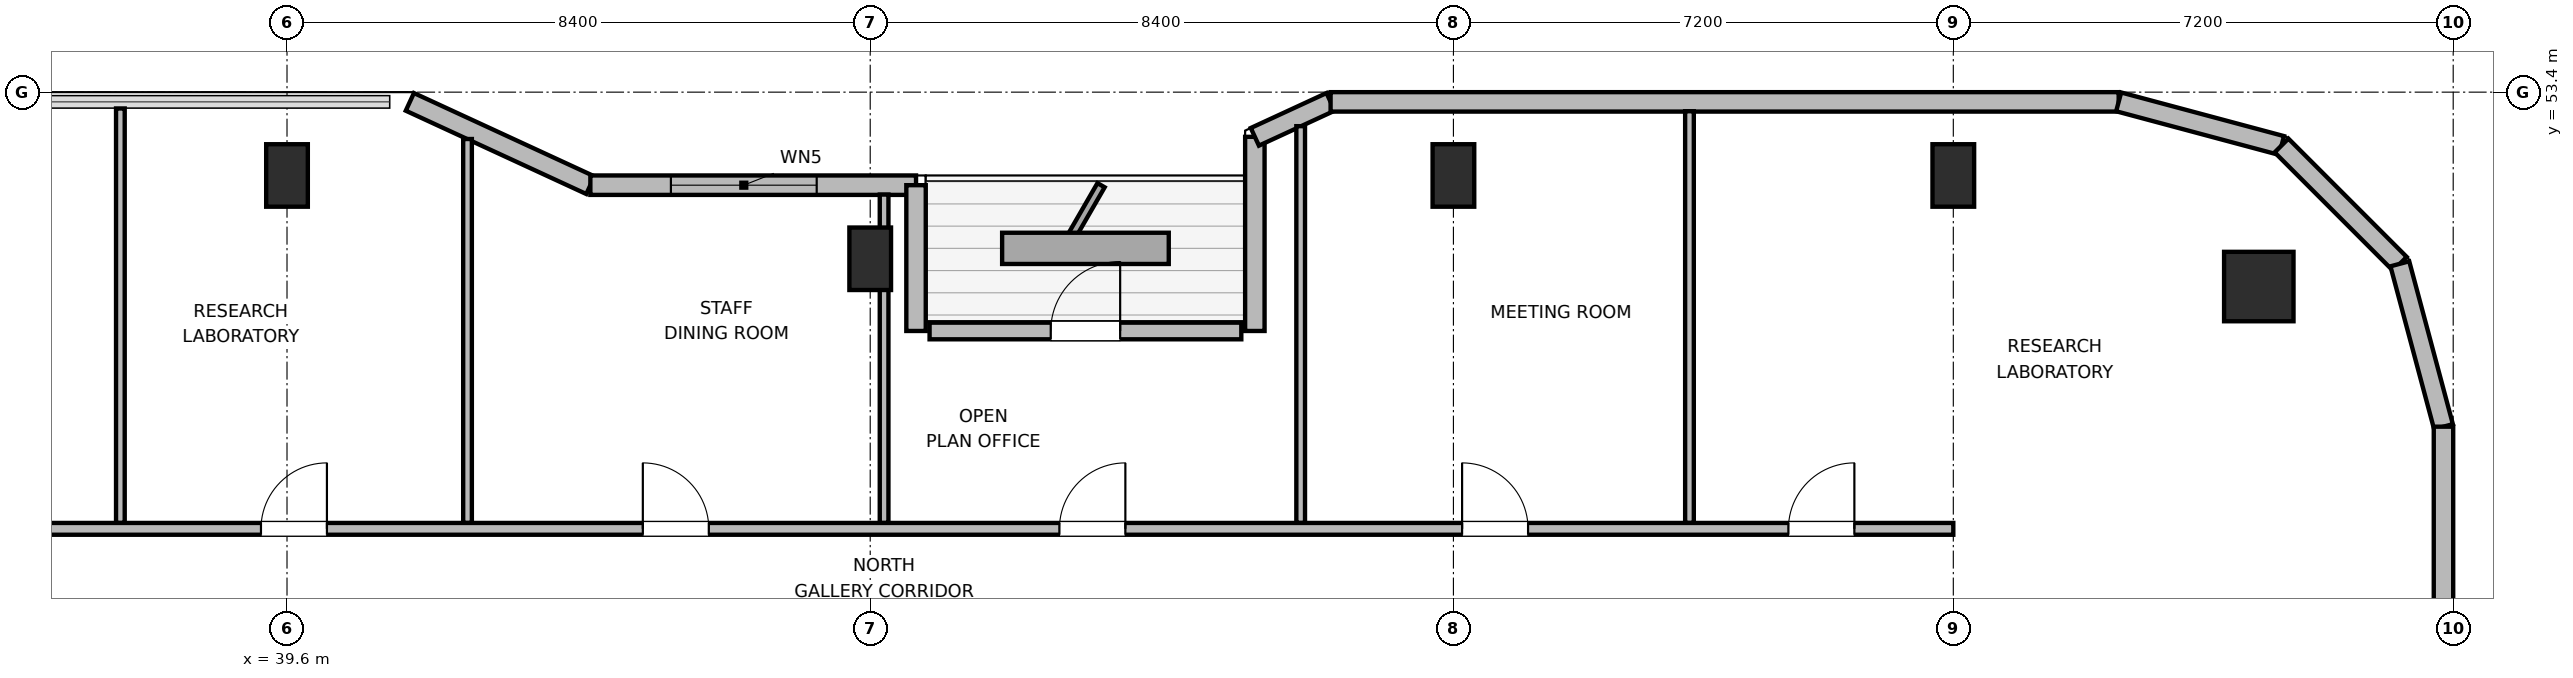
"""IFC4 building model, lengths in metres.
Left out: names, types, materials, properties, quantities, classifications, styles, units other than length and angle.
Written with IfcOpenShell. Run it as: python <this file> out.ifc"""

import sys

from ifc_helpers import new_model, si_unit, direction, frame, frame_2d, origin, origin_2d, place, context, subcontext, project, spatial, rectangle, circle, extrude, element, fill, save


model = new_model("IFC4")
c1 = context("Model", 3, precision=1e-05, world=origin(), true_north=direction((0.0, 1.0)))
c2 = subcontext(c1, "Body", "Model", "MODEL_VIEW")
j1 = project(units=[si_unit("LENGTHUNIT", "METRE"), si_unit("PLANEANGLEUNIT", "RADIAN")], contexts=[c1])
p1 = place(None, origin())
s1 = spatial("IfcSite", under=j1, at=p1, CompositionType="ELEMENT")
p2 = place(p1, origin())
s2 = spatial("IfcBuilding", under=s1, at=p2, CompositionType="ELEMENT")
p3 = place(p2, frame((0.0, 0.0, 262.8)))
s3 = spatial("IfcBuildingStorey", under=s2, at=p3, CompositionType="ELEMENT", Elevation=262.8)
p4 = place(p3, frame((68.0, 50.6, 0.0), z_axis=(0.0, 0.0, 1.0), x_axis=(1.0, 0.0, 0.0)))
e1 = element("IfcColumn", 1, at=p4, inside=s3, PredefinedType="COLUMN", context=c2, shape_type="SweptSolid", body=[
    extrude(circle(Radius=0.5, at=origin_2d()), origin(), (0.0, 0.0, 1.0), 3.9),
])
for number, where, z_axis, x_axis in (
    (2, (39.6, 52.2, 0.0), (0.0, 0.0, 1.0), (1.0, 0.0, 0.0)),
    (3, (48.0, 51.0, 0.0), (0.0, 0.0, 1.0), (1.0, 0.0, 0.0)),
    (4, (56.4, 52.2, 0.0), (0.0, 0.0, 1.0), (1.0, 0.0, 0.0)),
    (5, (63.6, 52.2, 0.0), (0.0, 0.0, 1.0), (1.0, 0.0, 0.0)),
):
    element("IfcColumn", number, at=place(p3, frame(where, z_axis=z_axis, x_axis=x_axis)), inside=s3, PredefinedType="COLUMN", context=c2, shape_type="SweptSolid", body=[
        extrude(rectangle(XDim=0.6, YDim=0.9, at=origin_2d()), origin(), (0.0, 0.0, 1.0), 3.9),
    ])
p5 = place(p3, frame((41.369, 53.26, 0.0), z_axis=(0.0, 0.0, 1.0), x_axis=(0.907956889006, -0.419063584324, 0.0)))
e6 = element("IfcWall", 6, at=p5, inside=s3, PredefinedType="SOLIDWALL", context=c2, shape_type="SweptSolid", body=[
    extrude(rectangle(XDim=2.864, YDim=0.28, at=frame_2d((1.432, 0.0))), origin(), (0.0, 0.0, 1.0), 2.265),
])
p6 = place(p3, frame((43.969, 52.06, 0.0), z_axis=(0.0, 0.0, 1.0), x_axis=(1.0, 0.0, 0.0)))
e7 = element("IfcWall", 7, at=p6, inside=s3, PredefinedType="SOLIDWALL", context=c2, shape_type="SweptSolid", body=[
    extrude(rectangle(XDim=4.691, YDim=0.28, at=frame_2d((2.345, 0.0))), origin(), (0.0, 0.0, 1.0), 2.265),
])
p7 = place(p6, frame((1.16, 0.0, 0.85)))
e8 = element("IfcOpeningElement", 8, at=p7, cuts=e7, PredefinedType="OPENING", context=c2, shape_type="SweptSolid", body=[
    extrude(rectangle(XDim=2.1, YDim=1.05, at=frame_2d((1.05, 0.525))), frame((0.0, 0.15, 0.0), z_axis=(0.0, -1.0, 0.0), x_axis=(1.0, 0.0, 0.0)), (0.0, 0.0, 1.0), 0.3),
])
p8 = place(p3, frame((48.66, 52.06, 0.0), z_axis=(0.0, 0.0, 1.0), x_axis=(0.0, -1.0, 0.0)))
e9 = element("IfcWall", 9, at=p8, inside=s3, PredefinedType="SOLIDWALL", context=c2, shape_type="SweptSolid", body=[
    extrude(rectangle(XDim=2.1, YDim=0.28, at=frame_2d((1.05, 0.0))), origin(), (0.0, 0.0, 1.0), 2.265),
])
p9 = place(p3, frame((48.855, 49.96, 0.0), z_axis=(0.0, 0.0, 1.0), x_axis=(1.0, 0.0, 0.0)))
e10 = element("IfcWall", 10, at=p9, inside=s3, PredefinedType="SOLIDWALL", context=c2, shape_type="SweptSolid", body=[
    extrude(rectangle(XDim=4.49, YDim=0.24, at=frame_2d((2.245, 0.0))), origin(), (0.0, 0.0, 1.0), 3.68),
])
p10 = place(p9, frame((1.745, 0.0, 0.0)))
e11 = element("IfcOpeningElement", 11, at=p10, cuts=e10, PredefinedType="OPENING", context=c2, shape_type="SweptSolid", body=[
    extrude(rectangle(XDim=1.0, YDim=2.02, at=frame_2d((0.5, 1.01))), frame((0.0, 0.13, 0.0), z_axis=(0.0, -1.0, 0.0), x_axis=(1.0, 0.0, 0.0)), (0.0, 0.0, 1.0), 0.26),
])
p11 = place(p3, frame((53.54, 49.96, 0.0), z_axis=(0.0, 0.0, 1.0), x_axis=(0.0, 1.0, 0.0)))
e12 = element("IfcWall", 12, at=p11, inside=s3, PredefinedType="SOLIDWALL", context=c2, shape_type="SweptSolid", body=[
    extrude(rectangle(XDim=2.796, YDim=0.28, at=frame_2d((1.398, 0.0))), origin(), (0.0, 0.0, 1.0), 2.265),
])
p12 = place(p3, frame((53.54, 52.756, 0.0), z_axis=(0.0, 0.0, 1.0), x_axis=(0.907893953211, 0.419199916176, 0.0)))
e13 = element("IfcWall", 13, at=p12, inside=s3, PredefinedType="SOLIDWALL", context=c2, shape_type="SweptSolid", body=[
    extrude(rectangle(XDim=1.201, YDim=0.28, at=frame_2d((0.601, 0.0))), origin(), (0.0, 0.0, 1.0), 3.68),
])
p13 = place(p3, frame((54.631, 53.26, 0.0), z_axis=(0.0, 0.0, 1.0), x_axis=(1.0, 0.0, 0.0)))
e14 = element("IfcWall", 14, at=p13, inside=s3, PredefinedType="SOLIDWALL", context=c2, shape_type="SweptSolid", body=[
    extrude(rectangle(XDim=11.351, YDim=0.28, at=frame_2d((5.675, 0.0))), origin(), (0.0, 0.0, 1.0), 3.68),
])
p14 = place(p3, frame((65.982, 53.26, 0.0), z_axis=(0.0, 0.0, 1.0), x_axis=(0.965937282298, -0.25877628691, 0.0)))
e15 = element("IfcWall", 15, at=p14, inside=s3, PredefinedType="SOLIDWALL", context=c2, shape_type="SweptSolid", body=[
    extrude(rectangle(XDim=2.428, YDim=0.28, at=frame_2d((1.214, 0.0))), origin(), (0.0, 0.0, 1.0), 3.68),
])
p15 = place(p3, frame((68.327, 52.632, 0.0), z_axis=(0.0, 0.0, 1.0), x_axis=(0.707106781187, -0.707106781187, 0.0)))
e16 = element("IfcWall", 16, at=p15, inside=s3, PredefinedType="SOLIDWALL", context=c2, shape_type="SweptSolid", body=[
    extrude(rectangle(XDim=2.41, YDim=0.28, at=frame_2d((1.205, 0.0))), origin(), (0.0, 0.0, 1.0), 3.68),
])
p16 = place(p3, frame((70.031, 50.927, 0.0), z_axis=(0.0, 0.0, 1.0), x_axis=(0.258751159445, -0.965944013639, 0.0)))
e17 = element("IfcWall", 17, at=p16, inside=s3, PredefinedType="SOLIDWALL", context=c2, shape_type="SweptSolid", body=[
    extrude(rectangle(XDim=2.429, YDim=0.28, at=frame_2d((1.214, 0.0))), origin(), (0.0, 0.0, 1.0), 3.68),
])
p17 = place(p3, frame((70.66, 48.582, 0.0), z_axis=(0.0, 0.0, 1.0), x_axis=(0.0, -1.0, 0.0)))
e18 = element("IfcWall", 18, at=p17, inside=s3, PredefinedType="SOLIDWALL", context=c2, shape_type="SweptSolid", body=[
    extrude(rectangle(XDim=5.842, YDim=0.28, at=frame_2d((2.921, 0.0))), origin(), (0.0, 0.0, 1.0), 3.68),
])
p18 = place(p3, frame((29.8, 47.11, 0.0), z_axis=(0.0, 0.0, 1.0), x_axis=(1.0, 0.0, 0.0)))
e19 = element("IfcWall", 19, at=p18, inside=s3, PredefinedType="PARTITIONING", context=c2, shape_type="SweptSolid", body=[
    extrude(rectangle(XDim=33.8, YDim=0.17, at=frame_2d((16.9, 0.0))), origin(), (0.0, 0.0, 1.0), 3.68),
])
p19 = place(p18, frame((0.725, 0.0, 0.0)))
e20 = element("IfcOpeningElement", 20, at=p19, cuts=e19, PredefinedType="OPENING", context=c2, shape_type="SweptSolid", body=[
    extrude(rectangle(XDim=0.95, YDim=2.04, at=frame_2d((0.475, 1.02))), frame((0.0, 0.095, 0.0), z_axis=(0.0, -1.0, 0.0), x_axis=(1.0, 0.0, 0.0)), (0.0, 0.0, 1.0), 0.19),
])
p20 = place(p18, frame((4.425, 0.0, 0.0)))
e21 = element("IfcOpeningElement", 21, at=p20, cuts=e19, PredefinedType="OPENING", context=c2, shape_type="SweptSolid", body=[
    extrude(rectangle(XDim=0.95, YDim=2.04, at=frame_2d((0.475, 1.02))), frame((0.0, 0.095, 0.0), z_axis=(0.0, -1.0, 0.0), x_axis=(1.0, 0.0, 0.0)), (0.0, 0.0, 1.0), 0.19),
])
p21 = place(p18, frame((9.425, 0.0, 0.0)))
e22 = element("IfcOpeningElement", 22, at=p21, cuts=e19, PredefinedType="OPENING", context=c2, shape_type="SweptSolid", body=[
    extrude(rectangle(XDim=0.95, YDim=2.04, at=frame_2d((0.475, 1.02))), frame((0.0, 0.095, 0.0), z_axis=(0.0, -1.0, 0.0), x_axis=(1.0, 0.0, 0.0)), (0.0, 0.0, 1.0), 0.19),
])
p22 = place(p18, frame((14.925, 0.0, 0.0)))
e23 = element("IfcOpeningElement", 23, at=p22, cuts=e19, PredefinedType="OPENING", context=c2, shape_type="SweptSolid", body=[
    extrude(rectangle(XDim=0.95, YDim=2.04, at=frame_2d((0.475, 1.02))), frame((0.0, 0.095, 0.0), z_axis=(0.0, -1.0, 0.0), x_axis=(1.0, 0.0, 0.0)), (0.0, 0.0, 1.0), 0.19),
])
p23 = place(p18, frame((20.925, 0.0, 0.0)))
e24 = element("IfcOpeningElement", 24, at=p23, cuts=e19, PredefinedType="OPENING", context=c2, shape_type="SweptSolid", body=[
    extrude(rectangle(XDim=0.95, YDim=2.04, at=frame_2d((0.475, 1.02))), frame((0.0, 0.095, 0.0), z_axis=(0.0, -1.0, 0.0), x_axis=(1.0, 0.0, 0.0)), (0.0, 0.0, 1.0), 0.19),
])
p24 = place(p18, frame((26.725, 0.0, 0.0)))
e25 = element("IfcOpeningElement", 25, at=p24, cuts=e19, PredefinedType="OPENING", context=c2, shape_type="SweptSolid", body=[
    extrude(rectangle(XDim=0.95, YDim=2.04, at=frame_2d((0.475, 1.02))), frame((0.0, 0.095, 0.0), z_axis=(0.0, -1.0, 0.0), x_axis=(1.0, 0.0, 0.0)), (0.0, 0.0, 1.0), 0.19),
])
p25 = place(p18, frame((31.425, 0.0, 0.0)))
e26 = element("IfcOpeningElement", 26, at=p25, cuts=e19, PredefinedType="OPENING", context=c2, shape_type="SweptSolid", body=[
    extrude(rectangle(XDim=0.95, YDim=2.04, at=frame_2d((0.475, 1.02))), frame((0.0, 0.095, 0.0), z_axis=(0.0, -1.0, 0.0), x_axis=(1.0, 0.0, 0.0)), (0.0, 0.0, 1.0), 0.19),
])
p26 = place(p3, frame((37.2, 47.197, 0.0), z_axis=(0.0, 0.0, 1.0), x_axis=(0.0, 1.0, 0.0)))
e27 = element("IfcWall", 27, at=p26, inside=s3, PredefinedType="PARTITIONING", context=c2, shape_type="SweptSolid", body=[
    extrude(rectangle(XDim=5.968, YDim=0.125, at=frame_2d((2.984, 0.0))), origin(), (0.0, 0.0, 1.0), 3.68),
])
p27 = place(p3, frame((42.2, 47.197, 0.0), z_axis=(0.0, 0.0, 1.0), x_axis=(0.0, 1.0, 0.0)))
e28 = element("IfcWall", 28, at=p27, inside=s3, PredefinedType="PARTITIONING", context=c2, shape_type="SweptSolid", body=[
    extrude(rectangle(XDim=5.528, YDim=0.125, at=frame_2d((2.764, 0.0))), origin(), (0.0, 0.0, 1.0), 3.043),
])
p28 = place(p3, frame((48.2, 47.197, 0.0), z_axis=(0.0, 0.0, 1.0), x_axis=(0.0, 1.0, 0.0)))
e29 = element("IfcWall", 29, at=p28, inside=s3, PredefinedType="PARTITIONING", context=c2, shape_type="SweptSolid", body=[
    extrude(rectangle(XDim=4.728, YDim=0.125, at=frame_2d((2.364, 0.0))), origin(), (0.0, 0.0, 1.0), 3.054),
])
p29 = place(p3, frame((54.2, 47.197, 0.0), z_axis=(0.0, 0.0, 1.0), x_axis=(0.0, 1.0, 0.0)))
e30 = element("IfcWall", 30, at=p29, inside=s3, PredefinedType="PARTITIONING", context=c2, shape_type="SweptSolid", body=[
    extrude(rectangle(XDim=5.713, YDim=0.125, at=frame_2d((2.856, 0.0))), origin(), (0.0, 0.0, 1.0), 3.043),
])
p30 = place(p3, frame((59.8, 47.197, 0.0), z_axis=(0.0, 0.0, 1.0), x_axis=(0.0, 1.0, 0.0)))
e31 = element("IfcWall", 31, at=p30, inside=s3, PredefinedType="PARTITIONING", context=c2, shape_type="SweptSolid", body=[
    extrude(rectangle(XDim=5.928, YDim=0.125, at=frame_2d((2.964, 0.0))), origin(), (0.0, 0.0, 1.0), 3.68),
])
p31 = place(p7, origin())
e32 = element("IfcWindow", 32, at=p31, inside=s3, PartitioningType="SINGLE_PANEL", PredefinedType="WINDOW", context=c2, shape_type="SweptSolid", body=[
    extrude(rectangle(XDim=2.1, YDim=1.05, at=frame_2d((1.05, 0.525))), frame((0.0, 0.03, 0.0), z_axis=(0.0, -1.0, 0.0), x_axis=(1.0, 0.0, 0.0)), (0.0, 0.0, 1.0), 0.06),
])
fill(e8, e32)
p32 = place(p10, origin())
e33 = element("IfcDoor", 33, at=p32, inside=s3, OperationType="SINGLE_SWING_RIGHT", PredefinedType="DOOR", context=c2, shape_type="SweptSolid", body=[
    extrude(rectangle(XDim=1.0, YDim=2.02, at=frame_2d((0.5, 1.01))), frame((0.0, 0.025, 0.0), z_axis=(0.0, -1.0, 0.0), x_axis=(1.0, 0.0, 0.0)), (0.0, 0.0, 1.0), 0.05),
])
fill(e11, e33)
p33 = place(p21, origin())
e34 = element("IfcDoor", 34, at=p33, inside=s3, OperationType="SINGLE_SWING_RIGHT", PredefinedType="DOOR", context=c2, shape_type="SweptSolid", body=[
    extrude(rectangle(XDim=0.95, YDim=2.04, at=frame_2d((0.475, 1.02))), frame((0.0, 0.025, 0.0), z_axis=(0.0, -1.0, 0.0), x_axis=(1.0, 0.0, 0.0)), (0.0, 0.0, 1.0), 0.05),
])
fill(e22, e34)
p34 = place(p22, origin())
e35 = element("IfcDoor", 35, at=p34, inside=s3, OperationType="SINGLE_SWING_LEFT", PredefinedType="DOOR", context=c2, shape_type="SweptSolid", body=[
    extrude(rectangle(XDim=0.95, YDim=2.04, at=frame_2d((0.475, 1.02))), frame((0.0, 0.025, 0.0), z_axis=(0.0, -1.0, 0.0), x_axis=(1.0, 0.0, 0.0)), (0.0, 0.0, 1.0), 0.05),
])
fill(e23, e35)
p35 = place(p23, origin())
e36 = element("IfcDoor", 36, at=p35, inside=s3, OperationType="SINGLE_SWING_RIGHT", PredefinedType="DOOR", context=c2, shape_type="SweptSolid", body=[
    extrude(rectangle(XDim=0.95, YDim=2.04, at=frame_2d((0.475, 1.02))), frame((0.0, 0.025, 0.0), z_axis=(0.0, -1.0, 0.0), x_axis=(1.0, 0.0, 0.0)), (0.0, 0.0, 1.0), 0.05),
])
fill(e24, e36)
p36 = place(p24, origin())
e37 = element("IfcDoor", 37, at=p36, inside=s3, OperationType="SINGLE_SWING_LEFT", PredefinedType="DOOR", context=c2, shape_type="SweptSolid", body=[
    extrude(rectangle(XDim=0.95, YDim=2.04, at=frame_2d((0.475, 1.02))), frame((0.0, 0.025, 0.0), z_axis=(0.0, -1.0, 0.0), x_axis=(1.0, 0.0, 0.0)), (0.0, 0.0, 1.0), 0.05),
])
fill(e25, e37)
p37 = place(p25, origin())
e38 = element("IfcDoor", 38, at=p37, inside=s3, OperationType="SINGLE_SWING_RIGHT", PredefinedType="DOOR", context=c2, shape_type="SweptSolid", body=[
    extrude(rectangle(XDim=0.95, YDim=2.04, at=frame_2d((0.475, 1.02))), frame((0.0, 0.025, 0.0), z_axis=(0.0, -1.0, 0.0), x_axis=(1.0, 0.0, 0.0)), (0.0, 0.0, 1.0), 0.05),
])
fill(e26, e38)
save(model, sys.argv[1])
